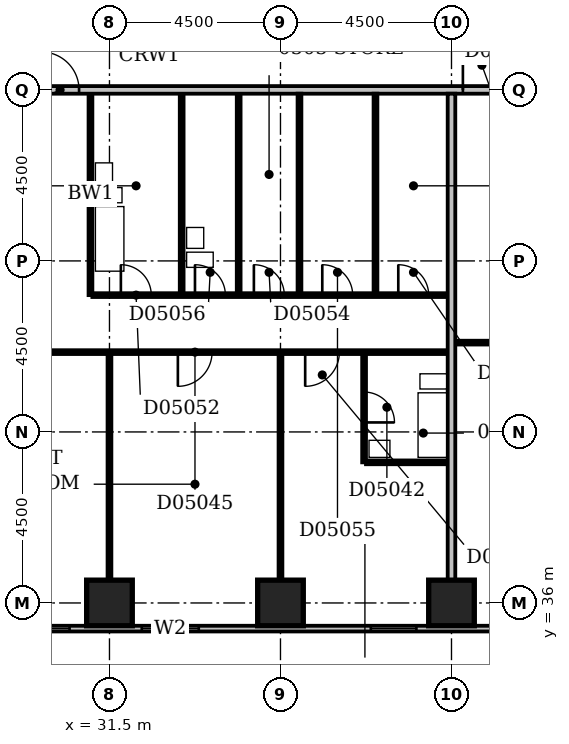
"""IFC4 building model, lengths in metres.
Left out: names, types, materials, properties, quantities, classifications, styles, units other than length and angle.
Written with IfcOpenShell. Run it as: python <this file> out.ifc"""

import sys

from ifc_helpers import new_model, si_unit, direction, frame, frame_2d, origin, origin_2d, place, context, subcontext, project, spatial, rectangle, extrude, element, fill, save


model = new_model("IFC4")
c1 = context("Model", 3, precision=1e-05, world=origin(), true_north=direction((0.0, 1.0)))
c2 = subcontext(c1, "Body", "Model", "MODEL_VIEW")
j1 = project(units=[si_unit("LENGTHUNIT", "METRE"), si_unit("PLANEANGLEUNIT", "RADIAN")], contexts=[c1])
p1 = place(None, origin())
s1 = spatial("IfcSite", under=j1, at=p1, CompositionType="ELEMENT")
p2 = place(p1, origin())
s2 = spatial("IfcBuilding", under=s1, at=p2, CompositionType="ELEMENT")
p3 = place(p2, frame((0.0, 0.0, 29.0)))
s3 = spatial("IfcBuildingStorey", under=s2, at=p3, CompositionType="ELEMENT", Elevation=29.0)
for number, where, z_axis, x_axis in (
    (1, (31.5, 36.0, -0.3), (0.0, 0.0, 1.0), (1.0, 0.0, 0.0)),
    (2, (36.0, 36.0, -0.3), (0.0, 0.0, 1.0), (1.0, 0.0, 0.0)),
    (3, (40.5, 36.0, -0.3), (0.0, 0.0, 1.0), (1.0, 0.0, 0.0)),
):
    element("IfcColumn", number, at=place(p3, frame(where, z_axis=z_axis, x_axis=x_axis)), inside=s3, PredefinedType="COLUMN", context=c2, shape_type="SweptSolid", body=[
        extrude(rectangle(XDim=1.2, YDim=1.2, at=origin_2d()), origin(), (0.0, 0.0, 1.0), 3.6),
    ])
p4 = place(p3, frame((23.1, 35.325, 0.0), z_axis=(0.0, 0.0, 1.0), x_axis=(1.0, 0.0, 0.0)))
e4 = element("IfcWall", 4, at=p4, inside=s3, PredefinedType="STANDARD", context=c2, shape_type="SweptSolid", body=[
    extrude(rectangle(XDim=45.15, YDim=0.15, at=frame_2d((22.575, 0.0))), origin(), (0.0, 0.0, 1.0), 2.7),
])
p5 = place(p4, frame((0.45, 0.0, 0.6)))
e5 = element("IfcOpeningElement", 5, at=p5, cuts=e4, PredefinedType="OPENING", context=c2, shape_type="SweptSolid", body=[
    extrude(rectangle(XDim=2.4, YDim=1.8, at=frame_2d((1.2, 0.9))), frame((0.0, 0.087, 0.0), z_axis=(0.0, -1.0, 0.0), x_axis=(1.0, 0.0, 0.0)), (0.0, 0.0, 1.0), 0.174),
])
p6 = place(p4, frame((4.95, 0.0, 0.6)))
e6 = element("IfcOpeningElement", 6, at=p6, cuts=e4, PredefinedType="OPENING", context=c2, shape_type="SweptSolid", body=[
    extrude(rectangle(XDim=2.4, YDim=1.8, at=frame_2d((1.2, 0.9))), frame((0.0, 0.087, 0.0), z_axis=(0.0, -1.0, 0.0), x_axis=(1.0, 0.0, 0.0)), (0.0, 0.0, 1.0), 0.174),
])
p7 = place(p4, frame((9.25, 0.0, 0.6)))
e7 = element("IfcOpeningElement", 7, at=p7, cuts=e4, PredefinedType="OPENING", context=c2, shape_type="SweptSolid", body=[
    extrude(rectangle(XDim=1.5, YDim=1.8, at=frame_2d((0.75, 0.9))), frame((0.0, 0.087, 0.0), z_axis=(0.0, -1.0, 0.0), x_axis=(1.0, 0.0, 0.0)), (0.0, 0.0, 1.0), 0.174),
])
p8 = place(p4, frame((15.277, 0.0, 0.6)))
e8 = element("IfcOpeningElement", 8, at=p8, cuts=e4, PredefinedType="OPENING", context=c2, shape_type="SweptSolid", body=[
    extrude(rectangle(XDim=1.2, YDim=1.8, at=frame_2d((0.6, 0.9))), frame((0.0, 0.087, 0.0), z_axis=(0.0, -1.0, 0.0), x_axis=(1.0, 0.0, 0.0)), (0.0, 0.0, 1.0), 0.174),
])
p9 = place(p4, frame((18.45, 0.0, 0.6)))
e9 = element("IfcOpeningElement", 9, at=p9, cuts=e4, PredefinedType="OPENING", context=c2, shape_type="SweptSolid", body=[
    extrude(rectangle(XDim=2.4, YDim=1.8, at=frame_2d((1.2, 0.9))), frame((0.0, 0.087, 0.0), z_axis=(0.0, -1.0, 0.0), x_axis=(1.0, 0.0, 0.0)), (0.0, 0.0, 1.0), 0.174),
])
p10 = place(p4, frame((22.95, 0.0, 0.6)))
e10 = element("IfcOpeningElement", 10, at=p10, cuts=e4, PredefinedType="OPENING", context=c2, shape_type="SweptSolid", body=[
    extrude(rectangle(XDim=2.4, YDim=1.8, at=frame_2d((1.2, 0.9))), frame((0.0, 0.087, 0.0), z_axis=(0.0, -1.0, 0.0), x_axis=(1.0, 0.0, 0.0)), (0.0, 0.0, 1.0), 0.174),
])
p11 = place(p4, frame((27.45, 0.0, 0.6)))
e11 = element("IfcOpeningElement", 11, at=p11, cuts=e4, PredefinedType="OPENING", context=c2, shape_type="SweptSolid", body=[
    extrude(rectangle(XDim=2.4, YDim=1.8, at=frame_2d((1.2, 0.9))), frame((0.0, 0.087, 0.0), z_axis=(0.0, -1.0, 0.0), x_axis=(1.0, 0.0, 0.0)), (0.0, 0.0, 1.0), 0.174),
])
p12 = place(p4, frame((31.95, 0.0, 0.6)))
e12 = element("IfcOpeningElement", 12, at=p12, cuts=e4, PredefinedType="OPENING", context=c2, shape_type="SweptSolid", body=[
    extrude(rectangle(XDim=2.4, YDim=1.8, at=frame_2d((1.2, 0.9))), frame((0.0, 0.087, 0.0), z_axis=(0.0, -1.0, 0.0), x_axis=(1.0, 0.0, 0.0)), (0.0, 0.0, 1.0), 0.174),
])
p13 = place(p4, frame((36.45, 0.0, 0.6)))
e13 = element("IfcOpeningElement", 13, at=p13, cuts=e4, PredefinedType="OPENING", context=c2, shape_type="SweptSolid", body=[
    extrude(rectangle(XDim=2.4, YDim=1.8, at=frame_2d((1.2, 0.9))), frame((0.0, 0.087, 0.0), z_axis=(0.0, -1.0, 0.0), x_axis=(1.0, 0.0, 0.0)), (0.0, 0.0, 1.0), 0.174),
])
p14 = place(p4, frame((40.797, 0.0, 0.6)))
e14 = element("IfcOpeningElement", 14, at=p14, cuts=e4, PredefinedType="OPENING", context=c2, shape_type="SweptSolid", body=[
    extrude(rectangle(XDim=0.6, YDim=1.8, at=frame_2d((0.3, 0.9))), frame((0.0, 0.087, 0.0), z_axis=(0.0, -1.0, 0.0), x_axis=(1.0, 0.0, 0.0)), (0.0, 0.0, 1.0), 0.174),
])
p15 = place(p3, frame((31.5, 36.6, 0.0), z_axis=(0.0, 0.0, 1.0), x_axis=(0.0, 1.0, 0.0)))
e15 = element("IfcWall", 15, at=p15, inside=s3, PredefinedType="PARTITIONING", context=c2, shape_type="SweptSolid", body=[
    extrude(rectangle(XDim=5.95, YDim=0.1, at=frame_2d((2.975, 0.0))), origin(), (0.0, 0.0, 1.0), 3.3),
])
p16 = place(p3, frame((36.0, 36.6, 0.0), z_axis=(0.0, 0.0, 1.0), x_axis=(0.0, 1.0, 0.0)))
e16 = element("IfcWall", 16, at=p16, inside=s3, PredefinedType="PARTITIONING", context=c2, shape_type="SweptSolid", body=[
    extrude(rectangle(XDim=5.95, YDim=0.1, at=frame_2d((2.975, 0.0))), origin(), (0.0, 0.0, 1.0), 2.4),
])
p17 = place(p3, frame((40.5, 36.6, 0.0), z_axis=(0.0, 0.0, 1.0), x_axis=(0.0, 1.0, 0.0)))
e17 = element("IfcWall", 17, at=p17, inside=s3, PredefinedType="PARTITIONING", context=c2, shape_type="SweptSolid", body=[
    extrude(rectangle(XDim=12.8, YDim=0.2, at=frame_2d((6.4, 0.0))), origin(), (0.0, 0.0, 1.0), 3.3),
])
p18 = place(p3, frame((38.2, 39.7, 0.0), z_axis=(0.0, 0.0, 1.0), x_axis=(0.0, 1.0, 0.0)))
e18 = element("IfcWall", 18, at=p18, inside=s3, PredefinedType="PLUMBINGWALL", context=c2, shape_type="SweptSolid", body=[
    extrude(rectangle(XDim=2.85, YDim=0.1, at=frame_2d((1.425, 0.0))), origin(), (0.0, 0.0, 1.0), 3.3),
])
p19 = place(p18, frame((1.05, 0.0, 0.0)))
e19 = element("IfcOpeningElement", 19, at=p19, cuts=e18, PredefinedType="OPENING", context=c2, shape_type="SweptSolid", body=[
    extrude(rectangle(XDim=0.8, YDim=2.1, at=frame_2d((0.4, 1.05))), frame((0.0, 0.062, 0.0), z_axis=(0.0, -1.0, 0.0), x_axis=(1.0, 0.0, 0.0)), (0.0, 0.0, 1.0), 0.124),
])
p20 = place(p3, frame((38.25, 39.7, 0.0), z_axis=(0.0, 0.0, 1.0), x_axis=(1.0, 0.0, 0.0)))
e20 = element("IfcWall", 20, at=p20, inside=s3, PredefinedType="PLUMBINGWALL", context=c2, shape_type="SweptSolid", body=[
    extrude(rectangle(XDim=2.15, YDim=0.1, at=frame_2d((1.075, 0.0))), origin(), (0.0, 0.0, 1.0), 3.3),
])
p21 = place(p3, frame((22.6, 42.6, 0.0), z_axis=(0.0, 0.0, 1.0), x_axis=(1.0, 0.0, 0.0)))
e21 = element("IfcWall", 21, at=p21, inside=s3, PredefinedType="PARTITIONING", context=c2, shape_type="SweptSolid", body=[
    extrude(rectangle(XDim=17.8, YDim=0.1, at=frame_2d((8.9, 0.0))), origin(), (0.0, 0.0, 1.0), 3.3),
])
p22 = place(p21, frame((3.9, 0.0, 0.0)))
e22 = element("IfcOpeningElement", 22, at=p22, cuts=e21, PredefinedType="OPENING", context=c2, shape_type="SweptSolid", body=[
    extrude(rectangle(XDim=0.9, YDim=2.1, at=frame_2d((0.45, 1.05))), frame((0.0, 0.062, 0.0), z_axis=(0.0, -1.0, 0.0), x_axis=(1.0, 0.0, 0.0)), (0.0, 0.0, 1.0), 0.124),
])
p23 = place(p21, frame((10.7, 0.0, 0.0)))
e23 = element("IfcOpeningElement", 23, at=p23, cuts=e21, PredefinedType="OPENING", context=c2, shape_type="SweptSolid", body=[
    extrude(rectangle(XDim=0.9, YDim=2.1, at=frame_2d((0.45, 1.05))), frame((0.0, 0.062, 0.0), z_axis=(0.0, -1.0, 0.0), x_axis=(1.0, 0.0, 0.0)), (0.0, 0.0, 1.0), 0.124),
])
p24 = place(p21, frame((14.05, 0.0, 0.0)))
e24 = element("IfcOpeningElement", 24, at=p24, cuts=e21, PredefinedType="OPENING", context=c2, shape_type="SweptSolid", body=[
    extrude(rectangle(XDim=0.9, YDim=2.1, at=frame_2d((0.45, 1.05))), frame((0.0, 0.062, 0.0), z_axis=(0.0, -1.0, 0.0), x_axis=(1.0, 0.0, 0.0)), (0.0, 0.0, 1.0), 0.124),
])
p25 = place(p3, frame((40.6, 42.85, 0.0), z_axis=(0.0, 0.0, 1.0), x_axis=(1.0, 0.0, 0.0)))
e25 = element("IfcWall", 25, at=p25, inside=s3, PredefinedType="PARTITIONING", context=c2, shape_type="SweptSolid", body=[
    extrude(rectangle(XDim=13.3, YDim=0.1, at=frame_2d((6.65, 0.0))), origin(), (0.0, 0.0, 1.0), 3.3),
])
p26 = place(p25, frame((3.9, 0.0, 0.0)))
e26 = element("IfcOpeningElement", 26, at=p26, cuts=e25, PredefinedType="OPENING", context=c2, shape_type="SweptSolid", body=[
    extrude(rectangle(XDim=0.9, YDim=2.1, at=frame_2d((0.45, 1.05))), frame((0.0, 0.062, 0.0), z_axis=(0.0, -1.0, 0.0), x_axis=(1.0, 0.0, 0.0)), (0.0, 0.0, 1.0), 0.124),
])
p27 = place(p25, frame((10.7, 0.0, 0.0)))
e27 = element("IfcOpeningElement", 27, at=p27, cuts=e25, PredefinedType="OPENING", context=c2, shape_type="SweptSolid", body=[
    extrude(rectangle(XDim=0.9, YDim=2.1, at=frame_2d((0.45, 1.05))), frame((0.0, 0.062, 0.0), z_axis=(0.0, -1.0, 0.0), x_axis=(1.0, 0.0, 0.0)), (0.0, 0.0, 1.0), 0.124),
])
p28 = place(p3, frame((31.0, 44.1, 0.0), z_axis=(0.0, 0.0, 1.0), x_axis=(0.0, 1.0, 0.0)))
e28 = element("IfcWall", 28, at=p28, inside=s3, PredefinedType="PLUMBINGWALL", context=c2, shape_type="SweptSolid", body=[
    extrude(rectangle(XDim=5.3, YDim=0.1, at=frame_2d((2.65, 0.0))), origin(), (0.0, 0.0, 1.0), 3.3),
])
p29 = place(p3, frame((31.05, 44.1, 0.0), z_axis=(0.0, 0.0, 1.0), x_axis=(1.0, 0.0, 0.0)))
e29 = element("IfcWall", 29, at=p29, inside=s3, PredefinedType="PARTITIONING", context=c2, shape_type="SweptSolid", body=[
    extrude(rectangle(XDim=9.35, YDim=0.1, at=frame_2d((4.675, 0.0))), origin(), (0.0, 0.0, 1.0), 3.3),
])
p30 = place(p29, frame((0.75, 0.0, 0.0)))
e30 = element("IfcOpeningElement", 30, at=p30, cuts=e29, PredefinedType="OPENING", context=c2, shape_type="SweptSolid", body=[
    extrude(rectangle(XDim=0.8, YDim=2.1, at=frame_2d((0.4, 1.05))), frame((0.0, 0.062, 0.0), z_axis=(0.0, -1.0, 0.0), x_axis=(1.0, 0.0, 0.0)), (0.0, 0.0, 1.0), 0.124),
])
p31 = place(p29, frame((8.05, 0.0, 0.0)))
e31 = element("IfcOpeningElement", 31, at=p31, cuts=e29, PredefinedType="OPENING", context=c2, shape_type="SweptSolid", body=[
    extrude(rectangle(XDim=0.8, YDim=2.1, at=frame_2d((0.4, 1.05))), frame((0.0, 0.062, 0.0), z_axis=(0.0, -1.0, 0.0), x_axis=(1.0, 0.0, 0.0)), (0.0, 0.0, 1.0), 0.124),
])
p32 = place(p29, frame((4.25, 0.0, 0.0)))
e32 = element("IfcOpeningElement", 32, at=p32, cuts=e29, PredefinedType="OPENING", context=c2, shape_type="SweptSolid", body=[
    extrude(rectangle(XDim=0.8, YDim=2.1, at=frame_2d((0.4, 1.05))), frame((0.0, 0.062, 0.0), z_axis=(0.0, -1.0, 0.0), x_axis=(1.0, 0.0, 0.0)), (0.0, 0.0, 1.0), 0.124),
])
p33 = place(p29, frame((6.05, 0.0, 0.0)))
e33 = element("IfcOpeningElement", 33, at=p33, cuts=e29, PredefinedType="OPENING", context=c2, shape_type="SweptSolid", body=[
    extrude(rectangle(XDim=0.8, YDim=2.1, at=frame_2d((0.4, 1.05))), frame((0.0, 0.062, 0.0), z_axis=(0.0, -1.0, 0.0), x_axis=(1.0, 0.0, 0.0)), (0.0, 0.0, 1.0), 0.124),
])
p34 = place(p29, frame((2.7, 0.0, 0.0)))
e34 = element("IfcOpeningElement", 34, at=p34, cuts=e29, PredefinedType="OPENING", context=c2, shape_type="SweptSolid", body=[
    extrude(rectangle(XDim=0.8, YDim=2.1, at=frame_2d((0.4, 1.05))), frame((0.0, 0.062, 0.0), z_axis=(0.0, -1.0, 0.0), x_axis=(1.0, 0.0, 0.0)), (0.0, 0.0, 1.0), 0.124),
])
for number, where, z_axis, x_axis in (
    (35, (33.4, 44.15, 0.0), (0.0, 0.0, 1.0), (0.0, 1.0, 0.0)),
    (36, (34.9, 44.15, 0.0), (0.0, 0.0, 1.0), (0.0, 1.0, 0.0)),
):
    element("IfcWall", number, at=place(p3, frame(where, z_axis=z_axis, x_axis=x_axis)), inside=s3, PredefinedType="PLUMBINGWALL", context=c2, shape_type="SweptSolid", body=[
        extrude(rectangle(XDim=5.25, YDim=0.1, at=frame_2d((2.625, 0.0))), origin(), (0.0, 0.0, 1.0), 3.3),
    ])
p35 = place(p3, frame((36.5, 44.15, 0.0), z_axis=(0.0, 0.0, 1.0), x_axis=(0.0, 1.0, 0.0)))
e37 = element("IfcWall", 37, at=p35, inside=s3, PredefinedType="PARTITIONING", context=c2, shape_type="SweptSolid", body=[
    extrude(rectangle(XDim=5.25, YDim=0.1, at=frame_2d((2.625, 0.0))), origin(), (0.0, 0.0, 1.0), 2.4),
])
p36 = place(p3, frame((38.5, 44.15, 0.0), z_axis=(0.0, 0.0, 1.0), x_axis=(0.0, 1.0, 0.0)))
e38 = element("IfcWall", 38, at=p36, inside=s3, PredefinedType="PARTITIONING", context=c2, shape_type="SweptSolid", body=[
    extrude(rectangle(XDim=5.25, YDim=0.1, at=frame_2d((2.625, 0.0))), origin(), (0.0, 0.0, 1.0), 3.3),
])
p37 = place(p3, frame((9.1, 49.5, 0.0), z_axis=(0.0, 0.0, 1.0), x_axis=(1.0, 0.0, 0.0)))
e39 = element("IfcWall", 39, at=p37, inside=s3, PredefinedType="PARTITIONING", context=c2, shape_type="SweptSolid", body=[
    extrude(rectangle(XDim=57.8, YDim=0.2, at=frame_2d((28.9, 0.0))), origin(), (0.0, 0.0, 1.0), 3.3),
])
p38 = place(p37, frame((20.6, 0.0, 0.0)))
e40 = element("IfcOpeningElement", 40, at=p38, cuts=e39, PredefinedType="OPENING", context=c2, shape_type="SweptSolid", body=[
    extrude(rectangle(XDim=1.0, YDim=2.1, at=frame_2d((0.5, 1.05))), frame((0.0, 0.112, 0.0), z_axis=(0.0, -1.0, 0.0), x_axis=(1.0, 0.0, 0.0)), (0.0, 0.0, 1.0), 0.224),
])
p39 = place(p37, frame((31.7, 0.0, 0.0)))
e41 = element("IfcOpeningElement", 41, at=p39, cuts=e39, PredefinedType="OPENING", context=c2, shape_type="SweptSolid", body=[
    extrude(rectangle(XDim=1.0, YDim=2.1, at=frame_2d((0.5, 1.05))), frame((0.0, 0.112, 0.0), z_axis=(0.0, -1.0, 0.0), x_axis=(1.0, 0.0, 0.0)), (0.0, 0.0, 1.0), 0.224),
])
p40 = place(p37, frame((47.6, 0.0, 0.0)))
e42 = element("IfcOpeningElement", 42, at=p40, cuts=e39, PredefinedType="OPENING", context=c2, shape_type="SweptSolid", body=[
    extrude(rectangle(XDim=1.0, YDim=2.1, at=frame_2d((0.5, 1.05))), frame((0.0, 0.112, 0.0), z_axis=(0.0, -1.0, 0.0), x_axis=(1.0, 0.0, 0.0)), (0.0, 0.0, 1.0), 0.224),
])
p41 = place(p37, frame((54.15, 0.0, 0.0)))
e43 = element("IfcOpeningElement", 43, at=p41, cuts=e39, PredefinedType="OPENING", context=c2, shape_type="SweptSolid", body=[
    extrude(rectangle(XDim=1.0, YDim=2.1, at=frame_2d((0.5, 1.05))), frame((0.0, 0.112, 0.0), z_axis=(0.0, -1.0, 0.0), x_axis=(1.0, 0.0, 0.0)), (0.0, 0.0, 1.0), 0.224),
])
p42 = place(p37, frame((10.65, 0.0, 0.0)))
e44 = element("IfcOpeningElement", 44, at=p42, cuts=e39, PredefinedType="OPENING", context=c2, shape_type="SweptSolid", body=[
    extrude(rectangle(XDim=0.9, YDim=2.1, at=frame_2d((0.45, 1.05))), frame((0.0, 0.112, 0.0), z_axis=(0.0, -1.0, 0.0), x_axis=(1.0, 0.0, 0.0)), (0.0, 0.0, 1.0), 0.224),
])
p43 = place(p6, origin())
e45 = element("IfcWindow", 45, at=p43, inside=s3, PartitioningType="SINGLE_PANEL", PredefinedType="WINDOW", context=c2, shape_type="SweptSolid", body=[
    extrude(rectangle(XDim=2.4, YDim=1.8, at=frame_2d((1.2, 0.9))), frame((0.0, 0.03, 0.0), z_axis=(0.0, -1.0, 0.0), x_axis=(1.0, 0.0, 0.0)), (0.0, 0.0, 1.0), 0.06),
])
fill(e6, e45)
p44 = place(p7, origin())
e46 = element("IfcWindow", 46, at=p44, inside=s3, PartitioningType="SINGLE_PANEL", PredefinedType="WINDOW", context=c2, shape_type="SweptSolid", body=[
    extrude(rectangle(XDim=1.5, YDim=1.8, at=frame_2d((0.75, 0.9))), frame((0.0, 0.03, 0.0), z_axis=(0.0, -1.0, 0.0), x_axis=(1.0, 0.0, 0.0)), (0.0, 0.0, 1.0), 0.06),
])
fill(e7, e46)
p45 = place(p8, origin())
e47 = element("IfcWindow", 47, at=p45, inside=s3, PartitioningType="SINGLE_PANEL", PredefinedType="WINDOW", context=c2, shape_type="SweptSolid", body=[
    extrude(rectangle(XDim=1.2, YDim=1.8, at=frame_2d((0.6, 0.9))), frame((0.0, 0.03, 0.0), z_axis=(0.0, -1.0, 0.0), x_axis=(1.0, 0.0, 0.0)), (0.0, 0.0, 1.0), 0.06),
])
fill(e8, e47)
p46 = place(p19, frame((0.8, 0.0, 0.0), z_axis=(0.0, 0.0, 1.0), x_axis=(-1.0, 0.0, 0.0)))
e48 = element("IfcDoor", 48, at=p46, inside=s3, OperationType="SINGLE_SWING_RIGHT", PredefinedType="DOOR", context=c2, shape_type="SweptSolid", body=[
    extrude(rectangle(XDim=0.8, YDim=2.1, at=frame_2d((0.4, 1.05))), frame((0.0, 0.025, 0.0), z_axis=(0.0, -1.0, 0.0), x_axis=(1.0, 0.0, 0.0)), (0.0, 0.0, 1.0), 0.05),
])
fill(e19, e48)
p47 = place(p23, frame((0.9, 0.0, 0.0), z_axis=(0.0, 0.0, 1.0), x_axis=(-1.0, 0.0, 0.0)))
e49 = element("IfcDoor", 49, at=p47, inside=s3, OperationType="SINGLE_SWING_RIGHT", PredefinedType="DOOR", context=c2, shape_type="SweptSolid", body=[
    extrude(rectangle(XDim=0.9, YDim=2.1, at=frame_2d((0.45, 1.05))), frame((0.0, 0.025, 0.0), z_axis=(0.0, -1.0, 0.0), x_axis=(1.0, 0.0, 0.0)), (0.0, 0.0, 1.0), 0.05),
])
fill(e23, e49)
p48 = place(p24, frame((0.9, 0.0, 0.0), z_axis=(0.0, 0.0, 1.0), x_axis=(-1.0, 0.0, 0.0)))
e50 = element("IfcDoor", 50, at=p48, inside=s3, OperationType="SINGLE_SWING_RIGHT", PredefinedType="DOOR", context=c2, shape_type="SweptSolid", body=[
    extrude(rectangle(XDim=0.9, YDim=2.1, at=frame_2d((0.45, 1.05))), frame((0.0, 0.025, 0.0), z_axis=(0.0, -1.0, 0.0), x_axis=(1.0, 0.0, 0.0)), (0.0, 0.0, 1.0), 0.05),
])
fill(e24, e50)
p49 = place(p30, origin())
e51 = element("IfcDoor", 51, at=p49, inside=s3, OperationType="SINGLE_SWING_LEFT", PredefinedType="DOOR", context=c2, shape_type="SweptSolid", body=[
    extrude(rectangle(XDim=0.8, YDim=2.1, at=frame_2d((0.4, 1.05))), frame((0.0, 0.025, 0.0), z_axis=(0.0, -1.0, 0.0), x_axis=(1.0, 0.0, 0.0)), (0.0, 0.0, 1.0), 0.05),
])
fill(e30, e51)
p50 = place(p31, origin())
e52 = element("IfcDoor", 52, at=p50, inside=s3, OperationType="SINGLE_SWING_LEFT", PredefinedType="DOOR", context=c2, shape_type="SweptSolid", body=[
    extrude(rectangle(XDim=0.8, YDim=2.1, at=frame_2d((0.4, 1.05))), frame((0.0, 0.025, 0.0), z_axis=(0.0, -1.0, 0.0), x_axis=(1.0, 0.0, 0.0)), (0.0, 0.0, 1.0), 0.05),
])
fill(e31, e52)
p51 = place(p32, origin())
e53 = element("IfcDoor", 53, at=p51, inside=s3, OperationType="SINGLE_SWING_LEFT", PredefinedType="DOOR", context=c2, shape_type="SweptSolid", body=[
    extrude(rectangle(XDim=0.8, YDim=2.1, at=frame_2d((0.4, 1.05))), frame((0.0, 0.025, 0.0), z_axis=(0.0, -1.0, 0.0), x_axis=(1.0, 0.0, 0.0)), (0.0, 0.0, 1.0), 0.05),
])
fill(e32, e53)
p52 = place(p33, origin())
e54 = element("IfcDoor", 54, at=p52, inside=s3, OperationType="SINGLE_SWING_LEFT", PredefinedType="DOOR", context=c2, shape_type="SweptSolid", body=[
    extrude(rectangle(XDim=0.8, YDim=2.1, at=frame_2d((0.4, 1.05))), frame((0.0, 0.025, 0.0), z_axis=(0.0, -1.0, 0.0), x_axis=(1.0, 0.0, 0.0)), (0.0, 0.0, 1.0), 0.05),
])
fill(e33, e54)
p53 = place(p34, origin())
e55 = element("IfcDoor", 55, at=p53, inside=s3, OperationType="SINGLE_SWING_LEFT", PredefinedType="DOOR", context=c2, shape_type="SweptSolid", body=[
    extrude(rectangle(XDim=0.8, YDim=2.1, at=frame_2d((0.4, 1.05))), frame((0.0, 0.025, 0.0), z_axis=(0.0, -1.0, 0.0), x_axis=(1.0, 0.0, 0.0)), (0.0, 0.0, 1.0), 0.05),
])
fill(e34, e55)
p54 = place(p38, origin())
e56 = element("IfcDoor", 56, at=p54, inside=s3, OperationType="SINGLE_SWING_LEFT", PredefinedType="DOOR", context=c2, shape_type="SweptSolid", body=[
    extrude(rectangle(XDim=1.0, YDim=2.1, at=frame_2d((0.5, 1.05))), frame((0.0, 0.025, 0.0), z_axis=(0.0, -1.0, 0.0), x_axis=(1.0, 0.0, 0.0)), (0.0, 0.0, 1.0), 0.05),
])
fill(e40, e56)
p55 = place(p39, origin())
e57 = element("IfcDoor", 57, at=p55, inside=s3, OperationType="SINGLE_SWING_LEFT", PredefinedType="DOOR", context=c2, shape_type="SweptSolid", body=[
    extrude(rectangle(XDim=1.0, YDim=2.1, at=frame_2d((0.5, 1.05))), frame((0.0, 0.025, 0.0), z_axis=(0.0, -1.0, 0.0), x_axis=(1.0, 0.0, 0.0)), (0.0, 0.0, 1.0), 0.05),
])
fill(e41, e57)
save(model, sys.argv[1])
